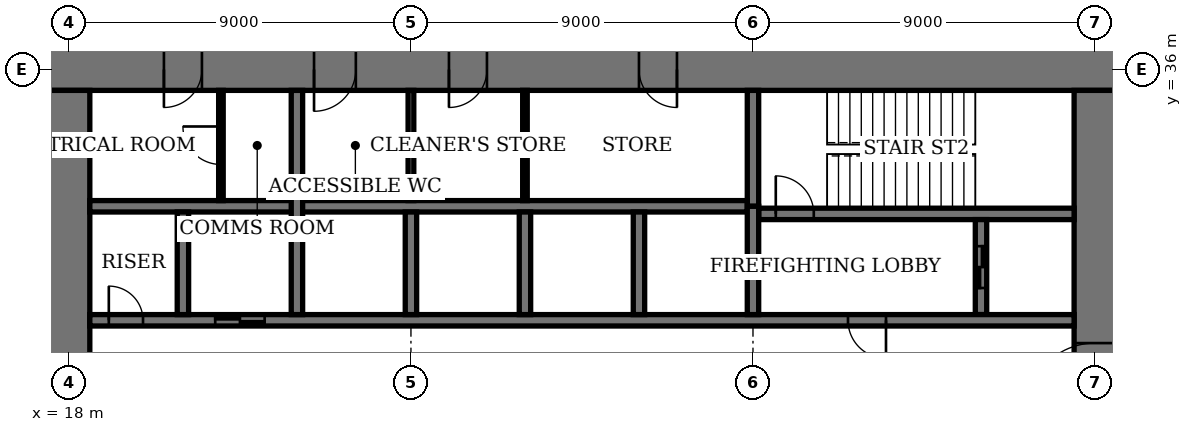
"""IFC4 building model, lengths in metres.
Left out: names, types, materials, properties, quantities, classifications, styles, units other than length and angle.
Written with IfcOpenShell. Run it as: python <this file> out.ifc"""

import sys

from ifc_helpers import new_model, si_unit, direction, frame, frame_2d, origin, place, context, subcontext, project, spatial, rectangle, extrude, element, fill, save


model = new_model("IFC4")
c1 = context("Model", 3, precision=1e-05, world=origin(), true_north=direction((0.0, 1.0)))
c2 = subcontext(c1, "Body", "Model", "MODEL_VIEW")
j1 = project(units=[si_unit("LENGTHUNIT", "METRE"), si_unit("PLANEANGLEUNIT", "RADIAN")], contexts=[c1])
p1 = place(None, origin())
s1 = spatial("IfcSite", under=j1, at=p1, CompositionType="ELEMENT")
p2 = place(p1, origin())
s2 = spatial("IfcBuilding", under=s1, at=p2, CompositionType="ELEMENT")
p3 = place(p2, frame((0.0, 0.0, 19.8)))
s3 = spatial("IfcBuildingStorey", under=s2, at=p3, CompositionType="ELEMENT", Elevation=19.8)
p4 = place(p3, frame((45.55, 36.0, 0.0), z_axis=(0.0, 0.0, 1.0), x_axis=(-1.0, 0.0, 0.0)))
e1 = element("IfcWall", 1, at=p4, inside=s3, PredefinedType="SHEAR", context=c2, shape_type="SweptSolid", body=[
    extrude(rectangle(XDim=28.1, YDim=1.1, at=frame_2d((14.05, 0.0))), origin(), (0.0, 0.0, 1.0), 4.0),
])
p5 = place(p4, frame((11.55, 0.0, 0.0)))
e2 = element("IfcOpeningElement", 2, at=p5, cuts=e1, PredefinedType="OPENING", context=c2, shape_type="SweptSolid", body=[
    extrude(rectangle(XDim=1.0, YDim=2.4, at=frame_2d((0.5, 1.2))), frame((0.0, 0.56, 0.0), z_axis=(0.0, -1.0, 0.0), x_axis=(1.0, 0.0, 0.0)), (0.0, 0.0, 1.0), 1.12),
])
p6 = place(p4, frame((16.55, 0.0, 0.0)))
e3 = element("IfcOpeningElement", 3, at=p6, cuts=e1, PredefinedType="OPENING", context=c2, shape_type="SweptSolid", body=[
    extrude(rectangle(XDim=1.0, YDim=2.4, at=frame_2d((0.5, 1.2))), frame((0.0, 0.56, 0.0), z_axis=(0.0, -1.0, 0.0), x_axis=(1.0, 0.0, 0.0)), (0.0, 0.0, 1.0), 1.12),
])
p7 = place(p4, frame((20.0, 0.0, 0.0)))
e4 = element("IfcOpeningElement", 4, at=p7, cuts=e1, PredefinedType="OPENING", context=c2, shape_type="SweptSolid", body=[
    extrude(rectangle(XDim=1.1, YDim=2.4, at=frame_2d((0.55, 1.2))), frame((0.0, 0.56, 0.0), z_axis=(0.0, -1.0, 0.0), x_axis=(1.0, 0.0, 0.0)), (0.0, 0.0, 1.0), 1.12),
])
p8 = place(p4, frame((24.05, 0.0, 0.0)))
e5 = element("IfcOpeningElement", 5, at=p8, cuts=e1, PredefinedType="OPENING", context=c2, shape_type="SweptSolid", body=[
    extrude(rectangle(XDim=1.0, YDim=2.4, at=frame_2d((0.5, 1.2))), frame((0.0, 0.56, 0.0), z_axis=(0.0, -1.0, 0.0), x_axis=(1.0, 0.0, 0.0)), (0.0, 0.0, 1.0), 1.12),
])
p9 = place(p3, frame((18.0, 35.45, 0.0), z_axis=(0.0, 0.0, 1.0), x_axis=(0.0, -1.0, 0.0)))
e6 = element("IfcWall", 6, at=p9, inside=s3, PredefinedType="SHEAR", context=c2, shape_type="SweptSolid", body=[
    extrude(rectangle(XDim=16.9, YDim=1.1, at=frame_2d((8.45, 0.0))), origin(), (0.0, 0.0, 1.0), 4.0),
])
p10 = place(p9, frame((8.45, 0.0, 0.0)))
e7 = element("IfcOpeningElement", 7, at=p10, cuts=e6, PredefinedType="OPENING", context=c2, shape_type="SweptSolid", body=[
    extrude(rectangle(XDim=1.8, YDim=2.4, at=frame_2d((0.9, 1.2))), frame((0.0, 0.56, 0.0), z_axis=(0.0, -1.0, 0.0), x_axis=(1.0, 0.0, 0.0)), (0.0, 0.0, 1.0), 1.12),
])
p11 = place(p3, frame((45.0, 18.55, 0.0), z_axis=(0.0, 0.0, 1.0), x_axis=(0.0, 1.0, 0.0)))
e8 = element("IfcWall", 8, at=p11, inside=s3, PredefinedType="SHEAR", context=c2, shape_type="SweptSolid", body=[
    extrude(rectangle(XDim=16.9, YDim=1.1, at=frame_2d((8.45, 0.0))), origin(), (0.0, 0.0, 1.0), 4.0),
])
p12 = place(p11, frame((8.45, 0.0, 0.0)))
e9 = element("IfcOpeningElement", 9, at=p12, cuts=e8, PredefinedType="OPENING", context=c2, shape_type="SweptSolid", body=[
    extrude(rectangle(XDim=1.8, YDim=2.4, at=frame_2d((0.9, 1.2))), frame((0.0, 0.56, 0.0), z_axis=(0.0, -1.0, 0.0), x_axis=(1.0, 0.0, 0.0)), (0.0, 0.0, 1.0), 1.12),
])
p13 = place(p3, frame((36.15, 32.2, 0.0), z_axis=(0.0, 0.0, 1.0), x_axis=(1.0, 0.0, 0.0)))
e10 = element("IfcWall", 10, at=p13, inside=s3, PredefinedType="SHEAR", context=c2, shape_type="SweptSolid", body=[
    extrude(rectangle(XDim=8.3, YDim=0.3, at=frame_2d((4.15, 0.0))), origin(), (0.0, 0.0, 1.0), 4.0),
])
p14 = place(p13, frame((0.45, 0.0, 0.0)))
e11 = element("IfcOpeningElement", 11, at=p14, cuts=e10, PredefinedType="OPENING", context=c2, shape_type="SweptSolid", body=[
    extrude(rectangle(XDim=1.0, YDim=2.4, at=frame_2d((0.5, 1.2))), frame((0.0, 0.16, 0.0), z_axis=(0.0, -1.0, 0.0), x_axis=(1.0, 0.0, 0.0)), (0.0, 0.0, 1.0), 0.32),
])
p15 = place(p3, frame((36.0, 32.4, 0.0), z_axis=(0.0, 0.0, 1.0), x_axis=(0.0, 1.0, 0.0)))
e12 = element("IfcWall", 12, at=p15, inside=s3, PredefinedType="SHEAR", context=c2, shape_type="SweptSolid", body=[
    extrude(rectangle(XDim=3.05, YDim=0.3, at=frame_2d((1.525, 0.0))), origin(), (0.0, 0.0, 1.0), 4.0),
])
p16 = place(p3, frame((42.0, 29.55, 0.0), z_axis=(0.0, 0.0, 1.0), x_axis=(0.0, 1.0, 0.0)))
e13 = element("IfcWall", 13, at=p16, inside=s3, PredefinedType="SHEAR", context=c2, shape_type="SweptSolid", body=[
    extrude(rectangle(XDim=2.5, YDim=0.3, at=frame_2d((1.25, 0.0))), origin(), (0.0, 0.0, 1.0), 4.0),
])
p17 = place(p16, frame((0.7, 0.0, 0.0)))
e14 = element("IfcOpeningElement", 14, at=p17, cuts=e13, PredefinedType="OPENING", context=c2, shape_type="SweptSolid", body=[
    extrude(rectangle(XDim=1.1, YDim=2.4, at=frame_2d((0.55, 1.2))), frame((0.0, 0.16, 0.0), z_axis=(0.0, -1.0, 0.0), x_axis=(1.0, 0.0, 0.0)), (0.0, 0.0, 1.0), 0.32),
])
p18 = place(p3, frame((18.55, 29.4, 0.0), z_axis=(0.0, 0.0, 1.0), x_axis=(1.0, 0.0, 0.0)))
e15 = element("IfcWall", 15, at=p18, inside=s3, PredefinedType="SHEAR", context=c2, shape_type="SweptSolid", body=[
    extrude(rectangle(XDim=25.9, YDim=0.3, at=frame_2d((12.95, 0.0))), origin(), (0.0, 0.0, 1.0), 4.0),
])
p19 = place(p18, frame((19.95, 0.0, 0.0)))
e16 = element("IfcOpeningElement", 16, at=p19, cuts=e15, PredefinedType="OPENING", context=c2, shape_type="SweptSolid", body=[
    extrude(rectangle(XDim=1.0, YDim=2.4, at=frame_2d((0.5, 1.2))), frame((0.0, 0.16, 0.0), z_axis=(0.0, -1.0, 0.0), x_axis=(1.0, 0.0, 0.0)), (0.0, 0.0, 1.0), 0.32),
])
p20 = place(p18, frame((0.5, 0.0, 0.0)))
e17 = element("IfcOpeningElement", 17, at=p20, cuts=e15, PredefinedType="OPENING", context=c2, shape_type="SweptSolid", body=[
    extrude(rectangle(XDim=0.9, YDim=2.1, at=frame_2d((0.45, 1.05))), frame((0.0, 0.16, 0.0), z_axis=(0.0, -1.0, 0.0), x_axis=(1.0, 0.0, 0.0)), (0.0, 0.0, 1.0), 0.32),
])
p21 = place(p18, frame((3.3, 0.0, 0.0)))
e18 = element("IfcOpeningElement", 18, at=p21, cuts=e15, PredefinedType="OPENING", context=c2, shape_type="SweptSolid", body=[
    extrude(rectangle(XDim=1.3, YDim=2.4, at=frame_2d((0.65, 1.2))), frame((0.0, 0.16, 0.0), z_axis=(0.0, -1.0, 0.0), x_axis=(1.0, 0.0, 0.0)), (0.0, 0.0, 1.0), 0.32),
])
p22 = place(p3, frame((18.55, 32.4, 0.0), z_axis=(0.0, 0.0, 1.0), x_axis=(1.0, 0.0, 0.0)))
e19 = element("IfcWall", 19, at=p22, inside=s3, PredefinedType="SHEAR", context=c2, shape_type="SweptSolid", body=[
    extrude(rectangle(XDim=17.3, YDim=0.3, at=frame_2d((8.65, 0.0))), origin(), (0.0, 0.0, 1.0), 4.0),
])
for number, where, z_axis, x_axis in (
    (20, (33.0, 29.55, 0.0), (0.0, 0.0, 1.0), (0.0, 1.0, 0.0)),
    (21, (30.0, 29.55, 0.0), (0.0, 0.0, 1.0), (0.0, 1.0, 0.0)),
    (22, (27.0, 29.55, 0.0), (0.0, 0.0, 1.0), (0.0, 1.0, 0.0)),
):
    element("IfcWall", number, at=place(p3, frame(where, z_axis=z_axis, x_axis=x_axis)), inside=s3, PredefinedType="SHEAR", context=c2, shape_type="SweptSolid", body=[
        extrude(rectangle(XDim=2.7, YDim=0.3, at=frame_2d((1.35, 0.0))), origin(), (0.0, 0.0, 1.0), 4.0),
    ])
p23 = place(p3, frame((24.0, 29.55, 0.0), z_axis=(0.0, 0.0, 1.0), x_axis=(0.0, 1.0, 0.0)))
e23 = element("IfcWall", 23, at=p23, inside=s3, PredefinedType="SHEAR", context=c2, shape_type="SweptSolid", body=[
    extrude(rectangle(XDim=5.9, YDim=0.3, at=frame_2d((2.95, 0.0))), origin(), (0.0, 0.0, 1.0), 4.0),
])
p24 = place(p3, frame((21.0, 29.55, 0.0), z_axis=(0.0, 0.0, 1.0), x_axis=(0.0, 1.0, 0.0)))
e24 = element("IfcWall", 24, at=p24, inside=s3, PredefinedType="SHEAR", context=c2, shape_type="SweptSolid", body=[
    extrude(rectangle(XDim=2.7, YDim=0.3, at=frame_2d((1.35, 0.0))), origin(), (0.0, 0.0, 1.0), 4.0),
])
p25 = place(p3, frame((36.0, 29.55, 0.0), z_axis=(0.0, 0.0, 1.0), x_axis=(0.0, 1.0, 0.0)))
e25 = element("IfcWall", 25, at=p25, inside=s3, PredefinedType="SHEAR", context=c2, shape_type="SweptSolid", body=[
    extrude(rectangle(XDim=2.85, YDim=0.3, at=frame_2d((1.425, 0.0))), origin(), (0.0, 0.0, 1.0), 4.0),
])
p26 = place(p3, frame((30.0, 32.55, 0.0), z_axis=(0.0, 0.0, 1.0), x_axis=(0.0, 1.0, 0.0)))
e26 = element("IfcWall", 26, at=p26, inside=s3, PredefinedType="PARTITIONING", context=c2, shape_type="SweptSolid", body=[
    extrude(rectangle(XDim=2.9, YDim=0.12, at=frame_2d((1.45, 0.0))), origin(), (0.0, 0.0, 1.0), 3.75),
])
p27 = place(p3, frame((27.0, 32.55, 0.0), z_axis=(0.0, 0.0, 1.0), x_axis=(0.0, 1.0, 0.0)))
e27 = element("IfcWall", 27, at=p27, inside=s3, PredefinedType="PARTITIONING", context=c2, shape_type="SweptSolid", body=[
    extrude(rectangle(XDim=2.9, YDim=0.15, at=frame_2d((1.45, 0.0))), origin(), (0.0, 0.0, 1.0), 3.75),
])
p28 = place(p3, frame((22.0, 32.55, 0.0), z_axis=(0.0, 0.0, 1.0), x_axis=(0.0, 1.0, 0.0)))
e28 = element("IfcWall", 28, at=p28, inside=s3, PredefinedType="PARTITIONING", context=c2, shape_type="SweptSolid", body=[
    extrude(rectangle(XDim=2.9, YDim=0.12, at=frame_2d((1.45, 0.0))), origin(), (0.0, 0.0, 1.0), 3.75),
])
p29 = place(p28, frame((0.95, 0.0, 0.0)))
e29 = element("IfcOpeningElement", 29, at=p29, cuts=e28, PredefinedType="OPENING", context=c2, shape_type="SweptSolid", body=[
    extrude(rectangle(XDim=1.0, YDim=2.4, at=frame_2d((0.5, 1.2))), frame((0.0, 0.07, 0.0), z_axis=(0.0, -1.0, 0.0), x_axis=(1.0, 0.0, 0.0)), (0.0, 0.0, 1.0), 0.14),
])
p30 = place(p12, origin())
e30 = element("IfcDoor", 30, at=p30, inside=s3, OperationType="DOUBLE_DOOR_DOUBLE_SWING", PredefinedType="DOOR", context=c2, shape_type="SweptSolid", body=[
    extrude(rectangle(XDim=1.8, YDim=2.4, at=frame_2d((0.9, 1.2))), frame((0.0, 0.03, 0.0), z_axis=(0.0, -1.0, 0.0), x_axis=(1.0, 0.0, 0.0)), (0.0, 0.0, 1.0), 0.06),
    extrude(rectangle(XDim=0.04, YDim=2.4, at=frame_2d((0.02, 1.2))), frame((0.0, 0.55, 0.0), z_axis=(0.0, -1.0, 0.0), x_axis=(1.0, 0.0, 0.0)), (0.0, 0.0, 1.0), 1.1),
    extrude(rectangle(XDim=0.04, YDim=2.4, at=frame_2d((1.78, 1.2))), frame((0.0, 0.55, 0.0), z_axis=(0.0, -1.0, 0.0), x_axis=(1.0, 0.0, 0.0)), (0.0, 0.0, 1.0), 1.1),
    extrude(rectangle(XDim=1.8, YDim=0.04, at=frame_2d((0.9, 2.38))), frame((0.0, 0.55, 0.0), z_axis=(0.0, -1.0, 0.0), x_axis=(1.0, 0.0, 0.0)), (0.0, 0.0, 1.0), 1.1),
])
fill(e9, e30)
p31 = place(p5, origin())
e31 = element("IfcDoor", 31, at=p31, inside=s3, OperationType="SINGLE_SWING_RIGHT", PredefinedType="DOOR", context=c2, shape_type="SweptSolid", body=[
    extrude(rectangle(XDim=1.0, YDim=2.4, at=frame_2d((0.5, 1.2))), frame((0.0, 0.025, 0.0), z_axis=(0.0, -1.0, 0.0), x_axis=(1.0, 0.0, 0.0)), (0.0, 0.0, 1.0), 0.05),
    extrude(rectangle(XDim=0.04, YDim=2.4, at=frame_2d((0.02, 1.2))), frame((0.0, 0.4, 0.0), z_axis=(0.0, -1.0, 0.0), x_axis=(1.0, 0.0, 0.0)), (0.0, 0.0, 1.0), 0.8),
    extrude(rectangle(XDim=0.04, YDim=2.4, at=frame_2d((0.98, 1.2))), frame((0.0, 0.4, 0.0), z_axis=(0.0, -1.0, 0.0), x_axis=(1.0, 0.0, 0.0)), (0.0, 0.0, 1.0), 0.8),
    extrude(rectangle(XDim=1.0, YDim=0.04, at=frame_2d((0.5, 2.38))), frame((0.0, 0.4, 0.0), z_axis=(0.0, -1.0, 0.0), x_axis=(1.0, 0.0, 0.0)), (0.0, 0.0, 1.0), 0.8),
])
fill(e2, e31)
p32 = place(p6, origin())
e32 = element("IfcDoor", 32, at=p32, inside=s3, OperationType="SINGLE_SWING_LEFT", PredefinedType="DOOR", context=c2, shape_type="SweptSolid", body=[
    extrude(rectangle(XDim=1.0, YDim=2.4, at=frame_2d((0.5, 1.2))), frame((0.0, 0.025, 0.0), z_axis=(0.0, -1.0, 0.0), x_axis=(1.0, 0.0, 0.0)), (0.0, 0.0, 1.0), 0.05),
    extrude(rectangle(XDim=0.04, YDim=2.4, at=frame_2d((0.02, 1.2))), frame((0.0, 0.4, 0.0), z_axis=(0.0, -1.0, 0.0), x_axis=(1.0, 0.0, 0.0)), (0.0, 0.0, 1.0), 0.8),
    extrude(rectangle(XDim=0.04, YDim=2.4, at=frame_2d((0.98, 1.2))), frame((0.0, 0.4, 0.0), z_axis=(0.0, -1.0, 0.0), x_axis=(1.0, 0.0, 0.0)), (0.0, 0.0, 1.0), 0.8),
    extrude(rectangle(XDim=1.0, YDim=0.04, at=frame_2d((0.5, 2.38))), frame((0.0, 0.4, 0.0), z_axis=(0.0, -1.0, 0.0), x_axis=(1.0, 0.0, 0.0)), (0.0, 0.0, 1.0), 0.8),
])
fill(e3, e32)
p33 = place(p7, origin())
e33 = element("IfcDoor", 33, at=p33, inside=s3, OperationType="SINGLE_SWING_LEFT", PredefinedType="DOOR", context=c2, shape_type="SweptSolid", body=[
    extrude(rectangle(XDim=1.1, YDim=2.4, at=frame_2d((0.55, 1.2))), frame((0.0, 0.025, 0.0), z_axis=(0.0, -1.0, 0.0), x_axis=(1.0, 0.0, 0.0)), (0.0, 0.0, 1.0), 0.05),
    extrude(rectangle(XDim=0.04, YDim=2.4, at=frame_2d((0.02, 1.2))), frame((0.0, 0.44, 0.0), z_axis=(0.0, -1.0, 0.0), x_axis=(1.0, 0.0, 0.0)), (0.0, 0.0, 1.0), 0.88),
    extrude(rectangle(XDim=0.04, YDim=2.4, at=frame_2d((1.08, 1.2))), frame((0.0, 0.44, 0.0), z_axis=(0.0, -1.0, 0.0), x_axis=(1.0, 0.0, 0.0)), (0.0, 0.0, 1.0), 0.88),
    extrude(rectangle(XDim=1.1, YDim=0.04, at=frame_2d((0.55, 2.38))), frame((0.0, 0.44, 0.0), z_axis=(0.0, -1.0, 0.0), x_axis=(1.0, 0.0, 0.0)), (0.0, 0.0, 1.0), 0.88),
])
fill(e4, e33)
p34 = place(p8, origin())
e34 = element("IfcDoor", 34, at=p34, inside=s3, OperationType="SINGLE_SWING_LEFT", PredefinedType="DOOR", context=c2, shape_type="SweptSolid", body=[
    extrude(rectangle(XDim=1.0, YDim=2.4, at=frame_2d((0.5, 1.2))), frame((0.0, 0.025, 0.0), z_axis=(0.0, -1.0, 0.0), x_axis=(1.0, 0.0, 0.0)), (0.0, 0.0, 1.0), 0.05),
    extrude(rectangle(XDim=0.04, YDim=2.4, at=frame_2d((0.02, 1.2))), frame((0.0, 0.4, 0.0), z_axis=(0.0, -1.0, 0.0), x_axis=(1.0, 0.0, 0.0)), (0.0, 0.0, 1.0), 0.8),
    extrude(rectangle(XDim=0.04, YDim=2.4, at=frame_2d((0.98, 1.2))), frame((0.0, 0.4, 0.0), z_axis=(0.0, -1.0, 0.0), x_axis=(1.0, 0.0, 0.0)), (0.0, 0.0, 1.0), 0.8),
    extrude(rectangle(XDim=1.0, YDim=0.04, at=frame_2d((0.5, 2.38))), frame((0.0, 0.4, 0.0), z_axis=(0.0, -1.0, 0.0), x_axis=(1.0, 0.0, 0.0)), (0.0, 0.0, 1.0), 0.8),
])
fill(e5, e34)
p35 = place(p14, origin())
e35 = element("IfcDoor", 35, at=p35, inside=s3, OperationType="SINGLE_SWING_RIGHT", PredefinedType="DOOR", context=c2, shape_type="SweptSolid", body=[
    extrude(rectangle(XDim=1.0, YDim=2.4, at=frame_2d((0.5, 1.2))), frame((0.0, 0.03, 0.0), z_axis=(0.0, -1.0, 0.0), x_axis=(1.0, 0.0, 0.0)), (0.0, 0.0, 1.0), 0.06),
])
fill(e11, e35)
p36 = place(p19, origin())
e36 = element("IfcDoor", 36, at=p36, inside=s3, OperationType="SINGLE_SWING_RIGHT", PredefinedType="DOOR", context=c2, shape_type="SweptSolid", body=[
    extrude(rectangle(XDim=1.0, YDim=2.4, at=frame_2d((0.5, 1.2))), frame((0.0, 0.03, 0.0), z_axis=(0.0, -1.0, 0.0), x_axis=(1.0, 0.0, 0.0)), (0.0, 0.0, 1.0), 0.06),
])
fill(e16, e36)
p37 = place(p20, origin())
e37 = element("IfcDoor", 37, at=p37, inside=s3, OperationType="SINGLE_SWING_RIGHT", PredefinedType="DOOR", context=c2, shape_type="SweptSolid", body=[
    extrude(rectangle(XDim=0.9, YDim=2.1, at=frame_2d((0.45, 1.05))), frame((0.0, 0.03, 0.0), z_axis=(0.0, -1.0, 0.0), x_axis=(1.0, 0.0, 0.0)), (0.0, 0.0, 1.0), 0.06),
])
fill(e17, e37)
p38 = place(p29, origin())
e38 = element("IfcDoor", 38, at=p38, inside=s3, OperationType="SINGLE_SWING_LEFT", PredefinedType="DOOR", context=c2, shape_type="SweptSolid", body=[
    extrude(rectangle(XDim=1.0, YDim=2.4, at=frame_2d((0.5, 1.2))), frame((0.0, 0.03, 0.0), z_axis=(0.0, -1.0, 0.0), x_axis=(1.0, 0.0, 0.0)), (0.0, 0.0, 1.0), 0.06),
])
fill(e29, e38)
p39 = place(p21, origin())
e39 = element("IfcDoor", 39, at=p39, inside=s3, OperationType="DOUBLE_DOOR_SLIDING", PredefinedType="DOOR", context=c2, shape_type="SweptSolid", body=[
    extrude(rectangle(XDim=1.3, YDim=2.4, at=frame_2d((0.65, 1.2))), frame((0.0, 0.02, 0.0), z_axis=(0.0, -1.0, 0.0), x_axis=(1.0, 0.0, 0.0)), (0.0, 0.0, 1.0), 0.04),
])
fill(e18, e39)
p40 = place(p17, origin())
e40 = element("IfcDoor", 40, at=p40, inside=s3, OperationType="DOUBLE_DOOR_SLIDING", PredefinedType="DOOR", context=c2, shape_type="SweptSolid", body=[
    extrude(rectangle(XDim=1.1, YDim=2.4, at=frame_2d((0.55, 1.2))), frame((0.0, 0.03, 0.0), z_axis=(0.0, -1.0, 0.0), x_axis=(1.0, 0.0, 0.0)), (0.0, 0.0, 1.0), 0.06),
])
fill(e14, e40)
save(model, sys.argv[1])
